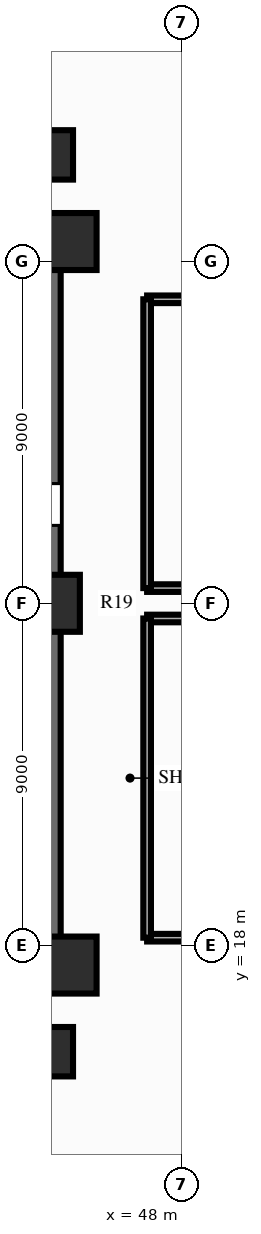
"""IFC4 building model, lengths in metres.
Left out: names, types, materials, properties, quantities, classifications, styles, units other than length and angle.
Written with IfcOpenShell. Run it as: python <this file> out.ifc"""

import sys

from ifc_helpers import new_model, si_unit, direction, frame, frame_2d, origin, origin_2d, place, context, subcontext, project, spatial, rectangle, extrude, source, transform, mapped, element, save


model = new_model("IFC4")
c1 = context("Model", 3, precision=1e-05, world=origin(), true_north=direction((0.0, 1.0)))
c2 = subcontext(c1, "Body", "Model", "MODEL_VIEW")
j1 = project(units=[si_unit("LENGTHUNIT", "METRE"), si_unit("PLANEANGLEUNIT", "RADIAN")], contexts=[c1])
p1 = place(None, origin())
s1 = spatial("IfcSite", under=j1, at=p1, CompositionType="ELEMENT")
p2 = place(p1, origin())
s2 = spatial("IfcBuilding", under=s1, at=p2, CompositionType="ELEMENT")
p3 = place(p2, frame((0.0, 0.0, -4.6)))
s3 = spatial("IfcBuildingStorey", under=s2, at=p3, CompositionType="ELEMENT", Elevation=-4.6)
p4 = place(p3, frame((44.5, 17.48, 0.0), z_axis=(0.0, 0.0, 1.0), x_axis=(0.0, 1.0, 0.0)))
e1 = element("IfcWall", 1, at=p4, inside=s3, PredefinedType="SHEAR", context=c2, shape_type="SweptSolid", body=[
    extrude(rectangle(XDim=19.04, YDim=0.65, at=frame_2d((9.52, 0.0))), origin(), (0.0, 0.0, 1.0), 4.6),
])
p5 = place(p4, frame((12.67, 0.0, 0.0), z_axis=(0.0, 0.0, 1.0), x_axis=(-1.0, 0.0, 0.0)))
e2 = element("IfcOpeningElement", 2, at=p5, cuts=e1, PredefinedType="OPENING", context=c2, shape_type="SweptSolid", body=[
    extrude(rectangle(XDim=1.1, YDim=2.15, at=frame_2d((0.55, 1.075))), frame((0.0, 0.337, 0.0), z_axis=(0.0, -1.0, 0.0), x_axis=(1.0, 0.0, 0.0)), (0.0, 0.0, 1.0), 0.674),
])
m1 = source(origin(), c2, "Body", "SweptSolid", [
    extrude(rectangle(XDim=1.5, YDim=1.5, at=origin_2d()), origin(), (0.0, 0.0, 1.0), 4.6),
])
for number, where, z_axis, x_axis in (
    (3, (45.02, 17.48, 0.0), (0.0, 0.0, 1.0), (1.0, 0.0, 0.0)),
    (4, (45.02, 36.52, 0.0), (0.0, 0.0, 1.0), (1.0, 0.0, 0.0)),
    (5, (44.58, 27.0, 0.0), (0.0, 0.0, 1.0), (1.0, 0.0, 0.0)),
):
    element("IfcColumn", number, at=place(p3, frame(where, z_axis=z_axis, x_axis=x_axis)), inside=s3, PredefinedType="COLUMN", context=c2, shape_type="MappedRepresentation", body=[
        mapped(m1, transform((0.0, 0.0, 0.0), scale=1.0)),
    ])
m2 = source(origin(), c2, "Body", "SweptSolid", [
    extrude(rectangle(XDim=1.3, YDim=1.3, at=origin_2d()), origin(), (0.0, 0.0, 1.0), 4.6),
])
for number, where, z_axis, x_axis in (
    (6, (44.5, 15.2, 0.0), (0.0, 0.0, 1.0), (1.0, 0.0, 0.0)),
    (7, (44.5, 38.8, 0.0), (0.0, 0.0, 1.0), (1.0, 0.0, 0.0)),
):
    element("IfcColumn", number, at=place(p3, frame(where, z_axis=z_axis, x_axis=x_axis)), inside=s3, PredefinedType="COLUMN", context=c2, shape_type="MappedRepresentation", body=[
        mapped(m2, transform((0.0, 0.0, 0.0), scale=1.0)),
    ])
for number, where, z_axis, x_axis in (
    (8, (47.1, 18.2, 0.0), (0.0, 0.0, 1.0), (1.0, 0.0, 0.0)),
    (9, (47.1, 26.6, 0.0), (0.0, 0.0, 1.0), (1.0, 0.0, 0.0)),
):
    element("IfcWall", number, at=place(p3, frame(where, z_axis=z_axis, x_axis=x_axis)), inside=s3, PredefinedType="PARTITIONING", context=c2, shape_type="SweptSolid", body=[
        extrude(rectangle(XDim=7.7, YDim=0.2, at=frame_2d((3.85, 0.0))), origin(), (0.0, 0.0, 1.0), 4.32),
    ])
p6 = place(p3, frame((47.1, 18.2, 0.0), z_axis=(0.0, 0.0, 1.0), x_axis=(0.0, 1.0, 0.0)))
e10 = element("IfcWall", 10, at=p6, inside=s3, PredefinedType="PARTITIONING", context=c2, shape_type="SweptSolid", body=[
    extrude(rectangle(XDim=8.4, YDim=0.2, at=frame_2d((4.2, 0.0))), origin(), (0.0, 0.0, 1.0), 4.32),
])
for number, where, z_axis, x_axis in (
    (11, (47.1, 27.4, 0.0), (0.0, 0.0, 1.0), (1.0, 0.0, 0.0)),
    (12, (47.1, 35.0, 0.0), (0.0, 0.0, 1.0), (1.0, 0.0, 0.0)),
):
    element("IfcWall", number, at=place(p3, frame(where, z_axis=z_axis, x_axis=x_axis)), inside=s3, PredefinedType="PARTITIONING", context=c2, shape_type="SweptSolid", body=[
        extrude(rectangle(XDim=7.7, YDim=0.2, at=frame_2d((3.85, 0.0))), origin(), (0.0, 0.0, 1.0), 4.32),
    ])
p7 = place(p3, frame((47.1, 27.4, 0.0), z_axis=(0.0, 0.0, 1.0), x_axis=(0.0, 1.0, 0.0)))
e13 = element("IfcWall", 13, at=p7, inside=s3, PredefinedType="PARTITIONING", context=c2, shape_type="SweptSolid", body=[
    extrude(rectangle(XDim=7.6, YDim=0.2, at=frame_2d((3.8, 0.0))), origin(), (0.0, 0.0, 1.0), 4.32),
])
save(model, sys.argv[1])
